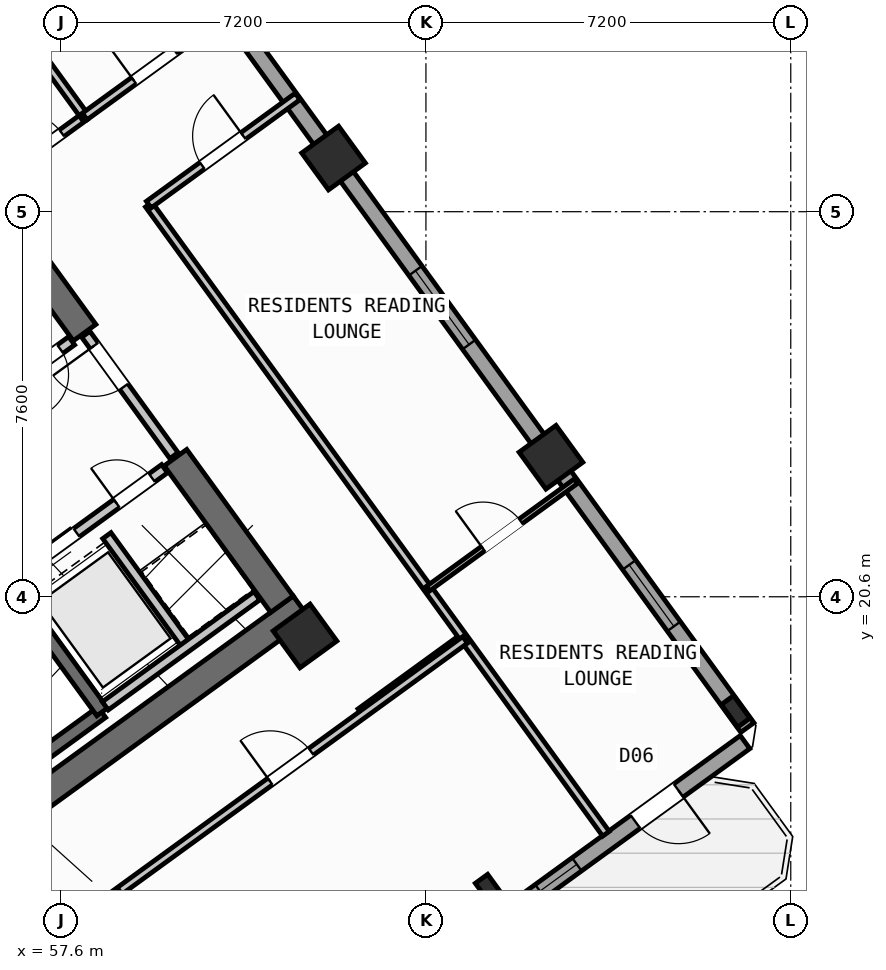
"""IFC4 building model, lengths in metres.
Left out: names, types, materials, properties, quantities, classifications, styles, units other than length and angle.
Written with IfcOpenShell. Run it as: python <this file> out.ifc"""

import sys

from ifc_helpers import new_model, si_unit, direction, frame, frame_2d, origin, origin_2d, place, context, subcontext, project, spatial, rectangle, hollow_rectangle, i_section, extrude, source, transform, mapped, element, fill, save


model = new_model("IFC4")
c1 = context("Model", 3, precision=1e-05, world=origin(), true_north=direction((0.0, 1.0)))
c2 = subcontext(c1, "Body", "Model", "MODEL_VIEW")
j1 = project(units=[si_unit("LENGTHUNIT", "METRE"), si_unit("PLANEANGLEUNIT", "RADIAN")], contexts=[c1])
p1 = place(None, origin())
s1 = spatial("IfcSite", under=j1, at=p1, CompositionType="ELEMENT")
p2 = place(p1, origin())
s2 = spatial("IfcBuilding", under=s1, at=p2, CompositionType="ELEMENT")
p3 = place(p2, frame((0.0, 0.0, 151.5)))
s3 = spatial("IfcBuildingStorey", under=s2, at=p3, CompositionType="ELEMENT", Elevation=151.5)
p4 = place(p3, frame((52.359, 13.14, 0.0), z_axis=(0.0, 0.0, 1.0), x_axis=(0.809014896919, 0.587788139183, 0.0)))
e1 = element("IfcWall", 1, at=p4, inside=s3, PredefinedType="SHEAR", context=c2, shape_type="SweptSolid", body=[
    extrude(rectangle(XDim=12.34, YDim=0.55, at=frame_2d((6.17, 0.0))), origin(), (0.0, 0.0, 1.0), 3.35),
])
p5 = place(p3, frame((61.958, 20.454, 0.0), z_axis=(0.0, 0.0, 1.0), x_axis=(-0.587802113096, 0.809004744015, 0.0)))
e2 = element("IfcWall", 2, at=p5, inside=s3, PredefinedType="SHEAR", context=c2, shape_type="SweptSolid", body=[
    extrude(rectangle(XDim=3.575, YDim=0.55, at=frame_2d((1.788, 0.0))), origin(), (0.0, 0.0, 1.0), 3.35),
])
p6 = place(p3, frame((58.064, 25.813, 0.0), z_axis=(0.0, 0.0, 1.0), x_axis=(-0.587764933797, 0.809031756236, 0.0)))
e3 = element("IfcWall", 3, at=p6, inside=s3, PredefinedType="SHEAR", context=c2, shape_type="SweptSolid", body=[
    extrude(rectangle(XDim=6.425, YDim=0.55, at=frame_2d((3.212, 0.0))), origin(), (0.0, 0.0, 1.0), 3.35),
])
m1 = source(origin(), c2, "Body", "SweptSolid", [
    extrude(i_section(OverallWidth=0.3, OverallDepth=0.55, WebThickness=0.015, FlangeThickness=0.029, at=origin_2d()), origin(), (0.0, 0.0, 1.0), 3.6),
])
p7 = place(p3, frame((66.058, 14.811, 0.0), z_axis=(0.0, 0.0, 1.0), x_axis=(0.809016994375, 0.587785252292, 0.0)))
e4 = element("IfcColumn", 4, at=p7, inside=s3, PredefinedType="COLUMN", context=c2, shape_type="MappedRepresentation", body=[
    mapped(m1, transform((0.0, 0.0, 0.0), scale=1.0)),
])
m2 = source(origin(), c2, "Body", "SweptSolid", [
    extrude(hollow_rectangle(XDim=0.9, YDim=0.9, WallThickness=0.036, at=origin_2d()), origin(), (0.0, 0.0, 1.0), 3.6),
])
p8 = place(p3, frame((62.414, 19.827, 0.0), z_axis=(0.0, 0.0, 1.0), x_axis=(0.809016994375, 0.587785252292, 0.0)))
e5 = element("IfcColumn", 5, at=p8, inside=s3, PredefinedType="COLUMN", context=c2, shape_type="MappedRepresentation", body=[
    mapped(m2, transform((0.0, 0.0, 0.0), scale=1.0)),
])
p9 = place(p3, frame((70.912, 18.338, 0.0), z_axis=(0.0, 0.0, 1.0), x_axis=(0.809016994375, 0.587785252292, 0.0)))
e6 = element("IfcColumn", 6, at=p9, inside=s3, PredefinedType="COLUMN", context=c2, shape_type="MappedRepresentation", body=[
    mapped(m1, transform((0.0, 0.0, 0.0), scale=1.0)),
])
for number, where, z_axis, x_axis in (
    (7, (67.268, 23.354, 0.0), (0.0, 0.0, 1.0), (0.809, 0.588, 0.0)),
    (8, (62.977, 29.259, 0.0), (0.0, 0.0, 1.0), (0.809, 0.588, 0.0)),
):
    element("IfcColumn", number, at=place(p3, frame(where, z_axis=z_axis, x_axis=x_axis)), inside=s3, PredefinedType="COLUMN", context=c2, shape_type="MappedRepresentation", body=[
        mapped(m2, transform((0.0, 0.0, 0.0), scale=1.0)),
    ])
p10 = place(p3, frame((43.938, 25.192, 0.0), z_axis=(0.0, 0.0, 1.0), x_axis=(0.809016324578, 0.587786174187, 0.0)))
e9 = element("IfcWall", 9, at=p10, inside=s3, PredefinedType="STANDARD", context=c2, shape_type="SweptSolid", body=[
    extrude(rectangle(XDim=17.587, YDim=0.32, at=frame_2d((8.794, 0.0))), origin(), (0.0, 0.0, 1.0), 3.35),
])
p11 = place(p10, frame((14.914, 0.0, 0.0)))
e10 = element("IfcOpeningElement", 10, at=p11, cuts=e9, PredefinedType="OPENING", context=c2, shape_type="SweptSolid", body=[
    extrude(rectangle(XDim=1.05, YDim=2.15, at=frame_2d((0.525, 1.075))), frame((0.0, 0.17, 0.0), z_axis=(0.0, -1.0, 0.0), x_axis=(1.0, 0.0, 0.0)), (0.0, 0.0, 1.0), 0.34),
])
p12 = place(p10, frame((2.368, 0.0, 0.8)))
e11 = element("IfcOpeningElement", 11, at=p12, cuts=e9, PredefinedType="OPENING", context=c2, shape_type="SweptSolid", body=[
    extrude(rectangle(XDim=2.1, YDim=1.55, at=frame_2d((1.05, 0.775))), frame((0.0, 0.17, 0.0), z_axis=(0.0, -1.0, 0.0), x_axis=(1.0, 0.0, 0.0)), (0.0, 0.0, 1.0), 0.34),
])
p13 = place(p10, frame((7.419, 0.0, 0.8)))
e12 = element("IfcOpeningElement", 12, at=p13, cuts=e9, PredefinedType="OPENING", context=c2, shape_type="SweptSolid", body=[
    extrude(rectangle(XDim=2.1, YDim=1.55, at=frame_2d((1.05, 0.775))), frame((0.0, 0.17, 0.0), z_axis=(0.0, -1.0, 0.0), x_axis=(1.0, 0.0, 0.0)), (0.0, 0.0, 1.0), 0.34),
])
p14 = place(p3, frame((58.455, 35.484, 0.0), z_axis=(0.0, 0.0, 1.0), x_axis=(0.587783625747, -0.809018176127, 0.0)))
e13 = element("IfcWall", 13, at=p14, inside=s3, PredefinedType="STANDARD", context=c2, shape_type="SweptSolid", body=[
    extrude(rectangle(XDim=21.587, YDim=0.32, at=frame_2d((10.794, 0.0))), origin(), (0.0, 0.0, 1.0), 2.775),
])
p15 = place(p14, frame((1.504, 0.0, 0.85)))
e14 = element("IfcOpeningElement", 14, at=p15, cuts=e13, PredefinedType="OPENING", context=c2, shape_type="SweptSolid", body=[
    extrude(rectangle(XDim=1.8, YDim=1.5, at=frame_2d((0.9, 0.75))), frame((0.0, 0.17, 0.0), z_axis=(0.0, -1.0, 0.0), x_axis=(1.0, 0.0, 0.0)), (0.0, 0.0, 1.0), 0.34),
])
p16 = place(p14, frame((10.444, 0.0, 0.85)))
e15 = element("IfcOpeningElement", 15, at=p16, cuts=e13, PredefinedType="OPENING", context=c2, shape_type="SweptSolid", body=[
    extrude(rectangle(XDim=1.8, YDim=1.5, at=frame_2d((0.9, 0.75))), frame((0.0, 0.17, 0.0), z_axis=(0.0, -1.0, 0.0), x_axis=(1.0, 0.0, 0.0)), (0.0, 0.0, 1.0), 0.34),
])
p17 = place(p14, frame((17.62, 0.0, 0.85)))
e16 = element("IfcOpeningElement", 16, at=p17, cuts=e13, PredefinedType="OPENING", context=c2, shape_type="SweptSolid", body=[
    extrude(rectangle(XDim=1.5, YDim=1.5, at=frame_2d((0.75, 0.75))), frame((0.0, 0.17, 0.0), z_axis=(0.0, -1.0, 0.0), x_axis=(1.0, 0.0, 0.0)), (0.0, 0.0, 1.0), 0.34),
])
p18 = place(p3, frame((71.098, 17.731, 0.0), z_axis=(0.0, 0.0, 1.0), x_axis=(-0.809021120468, -0.587779573171, 0.0)))
e17 = element("IfcWall", 17, at=p18, inside=s3, PredefinedType="STANDARD", context=c2, shape_type="SweptSolid", body=[
    extrude(rectangle(XDim=17.588, YDim=0.32, at=frame_2d((8.794, 0.0))), origin(), (0.0, 0.0, 1.0), 3.35),
])
p19 = place(p18, frame((1.624, 0.0, 0.0)))
e18 = element("IfcOpeningElement", 18, at=p19, cuts=e17, PredefinedType="OPENING", context=c2, shape_type="SweptSolid", body=[
    extrude(rectangle(XDim=1.05, YDim=2.15, at=frame_2d((0.525, 1.075))), frame((0.0, 0.17, 0.0), z_axis=(0.0, -1.0, 0.0), x_axis=(1.0, 0.0, 0.0)), (0.0, 0.0, 1.0), 0.34),
])
p20 = place(p18, frame((4.104, 0.0, 1.0)))
e19 = element("IfcOpeningElement", 19, at=p20, cuts=e17, PredefinedType="OPENING", context=c2, shape_type="SweptSolid", body=[
    extrude(rectangle(XDim=0.9, YDim=1.25, at=frame_2d((0.45, 0.625))), frame((0.0, 0.17, 0.0), z_axis=(0.0, -1.0, 0.0), x_axis=(1.0, 0.0, 0.0)), (0.0, 0.0, 1.0), 0.34),
])
p21 = place(p18, frame((7.879, 0.0, 0.85)))
e20 = element("IfcOpeningElement", 20, at=p21, cuts=e17, PredefinedType="OPENING", context=c2, shape_type="SweptSolid", body=[
    extrude(rectangle(XDim=1.8, YDim=1.5, at=frame_2d((0.9, 0.75))), frame((0.0, 0.17, 0.0), z_axis=(0.0, -1.0, 0.0), x_axis=(1.0, 0.0, 0.0)), (0.0, 0.0, 1.0), 0.34),
])
p22 = place(p18, frame((13.529, 0.0, 0.85)))
e21 = element("IfcOpeningElement", 21, at=p22, cuts=e17, PredefinedType="OPENING", context=c2, shape_type="SweptSolid", body=[
    extrude(rectangle(XDim=1.5, YDim=1.5, at=frame_2d((0.75, 0.75))), frame((0.0, 0.17, 0.0), z_axis=(0.0, -1.0, 0.0), x_axis=(1.0, 0.0, 0.0)), (0.0, 0.0, 1.0), 0.34),
])
p23 = place(p3, frame((52.472, 14.013, 0.0), z_axis=(0.0, 0.0, 1.0), x_axis=(0.809028366311, 0.587769599847, 0.0)))
e22 = element("IfcWall", 22, at=p23, inside=s3, PredefinedType="SHEAR", context=c2, shape_type="SweptSolid", body=[
    extrude(rectangle(XDim=7.33, YDim=0.26, at=frame_2d((3.665, 0.0))), origin(), (0.0, 0.0, 1.0), 3.35),
])
p24 = place(p3, frame((58.41, 18.327, 0.0), z_axis=(0.0, 0.0, 1.0), x_axis=(-0.58776738483, 0.809029975545, 0.0)))
e23 = element("IfcWall", 23, at=p24, inside=s3, PredefinedType="SHEAR", context=c2, shape_type="SweptSolid", body=[
    extrude(rectangle(XDim=3.16, YDim=0.26, at=frame_2d((1.58, 0.0))), origin(), (0.0, 0.0, 1.0), 3.35),
])
p25 = place(p3, frame((56.553, 20.884, 0.0), z_axis=(0.0, 0.0, 1.0), x_axis=(0.809023564264, 0.58777620951, 0.0)))
e24 = element("IfcWall", 24, at=p25, inside=s3, PredefinedType="STANDARD", context=c2, shape_type="SweptSolid", body=[
    extrude(rectangle(XDim=3.818, YDim=0.2, at=frame_2d((1.909, 0.0))), origin(), (0.0, 0.0, 1.0), 3.34),
])
p26 = place(p25, frame((0.57, 0.0, 0.0)))
e25 = element("IfcOpeningElement", 25, at=p26, cuts=e24, PredefinedType="OPENING", context=c2, shape_type="SweptSolid", body=[
    extrude(rectangle(XDim=1.1, YDim=2.15, at=frame_2d((0.55, 1.075))), frame((0.0, 0.11, 0.0), z_axis=(0.0, -1.0, 0.0), x_axis=(1.0, 0.0, 0.0)), (0.0, 0.0, 1.0), 0.22),
])
p27 = place(p25, frame((2.65, 0.0, 0.0)))
e26 = element("IfcOpeningElement", 26, at=p27, cuts=e24, PredefinedType="OPENING", context=c2, shape_type="SweptSolid", body=[
    extrude(rectangle(XDim=0.86, YDim=2.05, at=frame_2d((0.43, 1.025))), frame((0.0, 0.11, 0.0), z_axis=(0.0, -1.0, 0.0), x_axis=(1.0, 0.0, 0.0)), (0.0, 0.0, 1.0), 0.22),
])
p28 = place(p3, frame((60.067, 19.655, 0.0), z_axis=(0.0, 0.0, 1.0), x_axis=(-0.587800520745, 0.809005900975, 0.0)))
e27 = element("IfcWall", 27, at=p28, inside=s3, PredefinedType="STANDARD", context=c2, shape_type="SweptSolid", body=[
    extrude(rectangle(XDim=2.66, YDim=0.2, at=frame_2d((1.33, 0.0))), origin(), (0.0, 0.0, 1.0), 3.34),
])
p29 = place(p3, frame((58.472, 18.447, 0.0), z_axis=(0.0, 0.0, 1.0), x_axis=(0.809018631237, 0.587782999339, 0.0)))
e28 = element("IfcWall", 28, at=p29, inside=s3, PredefinedType="STANDARD", context=c2, shape_type="SweptSolid", body=[
    extrude(rectangle(XDim=3.698, YDim=0.2, at=frame_2d((1.849, 0.0))), origin(), (0.0, 0.0, 1.0), 3.34),
])
p30 = place(p3, frame((53.425, 22.468, 0.0), z_axis=(0.0, 0.0, 1.0), x_axis=(0.809024377198, 0.587775090574, 0.0)))
e29 = element("IfcWall", 29, at=p30, inside=s3, PredefinedType="STANDARD", context=c2, shape_type="SweptSolid", body=[
    extrude(rectangle(XDim=5.418, YDim=0.2, at=frame_2d((2.709, 0.0))), origin(), (0.0, 0.0, 1.0), 3.34),
])
p31 = place(p30, frame((4.28, 0.0, 0.0)))
e30 = element("IfcOpeningElement", 30, at=p31, cuts=e29, PredefinedType="OPENING", context=c2, shape_type="SweptSolid", body=[
    extrude(rectangle(XDim=0.86, YDim=2.05, at=frame_2d((0.43, 1.025))), frame((0.0, 0.11, 0.0), z_axis=(0.0, -1.0, 0.0), x_axis=(1.0, 0.0, 0.0)), (0.0, 0.0, 1.0), 0.22),
])
p32 = place(p30, frame((1.45, 0.0, 0.0)))
e31 = element("IfcOpeningElement", 31, at=p32, cuts=e29, PredefinedType="OPENING", context=c2, shape_type="SweptSolid", body=[
    extrude(rectangle(XDim=0.86, YDim=2.05, at=frame_2d((0.43, 1.025))), frame((0.0, 0.11, 0.0), z_axis=(0.0, -1.0, 0.0), x_axis=(1.0, 0.0, 0.0)), (0.0, 0.0, 1.0), 0.22),
])
p33 = place(p3, frame((59.827, 23.386, 0.0), z_axis=(0.0, 0.0, 1.0), x_axis=(-0.587803840107, 0.809003489211, 0.0)))
e32 = element("IfcWall", 32, at=p33, inside=s3, PredefinedType="STANDARD", context=c2, shape_type="SweptSolid", body=[
    extrude(rectangle(XDim=2.96, YDim=0.2, at=frame_2d((1.48, 0.0))), origin(), (0.0, 0.0, 1.0), 3.34),
])
p34 = place(p33, frame((1.68, 0.0, 0.0)))
e33 = element("IfcOpeningElement", 33, at=p34, cuts=e32, PredefinedType="OPENING", context=c2, shape_type="SweptSolid", body=[
    extrude(rectangle(XDim=1.0, YDim=2.1, at=frame_2d((0.5, 1.05))), frame((0.0, 0.11, 0.0), z_axis=(0.0, -1.0, 0.0), x_axis=(1.0, 0.0, 0.0)), (0.0, 0.0, 1.0), 0.22),
])
p35 = place(p3, frame((63.507, 18.322, 0.0), z_axis=(0.0, 0.0, 1.0), x_axis=(0.809034604122, 0.587761013791, 0.0)))
e34 = element("IfcWall", 34, at=p35, inside=s3, PredefinedType="PARTITIONING", context=c2, shape_type="SweptSolid", body=[
    extrude(rectangle(XDim=2.51, YDim=0.16, at=frame_2d((1.255, 0.0))), origin(), (0.0, 0.0, 1.0), 3.34),
])
p36 = place(p3, frame((56.281, 28.782, 0.0), z_axis=(0.0, 0.0, 1.0), x_axis=(0.80902286611, 0.587777170458, 0.0)))
e35 = element("IfcWall", 35, at=p36, inside=s3, PredefinedType="PARTITIONING", context=c2, shape_type="SweptSolid", body=[
    extrude(rectangle(XDim=2.208, YDim=0.16, at=frame_2d((1.104, 0.0))), origin(), (0.0, 0.0, 1.0), 3.34),
])
p37 = place(p36, frame((0.648, 0.0, 0.0)))
e36 = element("IfcOpeningElement", 36, at=p37, cuts=e35, PredefinedType="OPENING", context=c2, shape_type="SweptSolid", body=[
    extrude(rectangle(XDim=1.0, YDim=2.1, at=frame_2d((0.5, 1.05))), frame((0.0, 0.09, 0.0), z_axis=(0.0, -1.0, 0.0), x_axis=(1.0, 0.0, 0.0)), (0.0, 0.0, 1.0), 0.18),
])
p38 = place(p3, frame((68.353, 15.922, 0.0), z_axis=(0.0, 0.0, 1.0), x_axis=(-0.587782002009, 0.809019355834, 0.0)))
e37 = element("IfcWall", 37, at=p38, inside=s3, PredefinedType="PARTITIONING", context=c2, shape_type="SweptSolid", body=[
    extrude(rectangle(XDim=15.35, YDim=0.16, at=frame_2d((7.675, 0.0))), origin(), (0.0, 0.0, 1.0), 3.34),
])
p39 = place(p3, frame((58.067, 30.08, 0.0), z_axis=(0.0, 0.0, 1.0), x_axis=(-0.587812175236, 0.808997433027, 0.0)))
e38 = element("IfcWall", 38, at=p39, inside=s3, PredefinedType="PARTITIONING", context=c2, shape_type="SweptSolid", body=[
    extrude(rectangle(XDim=4.2, YDim=0.16, at=frame_2d((2.1, 0.0))), origin(), (0.0, 0.0, 1.0), 3.34),
])
p40 = place(p3, frame((59.331, 28.341, 0.0), z_axis=(0.0, 0.0, 1.0), x_axis=(0.809003564202, 0.587803736896, 0.0)))
e39 = element("IfcWall", 39, at=p40, inside=s3, PredefinedType="PARTITIONING", context=c2, shape_type="SweptSolid", body=[
    extrude(rectangle(XDim=3.63, YDim=0.16, at=frame_2d((1.815, 0.0))), origin(), (0.0, 0.0, 1.0), 3.34),
])
p41 = place(p40, frame((1.305, 0.0, 0.0)))
e40 = element("IfcOpeningElement", 40, at=p41, cuts=e39, PredefinedType="OPENING", context=c2, shape_type="SweptSolid", body=[
    extrude(rectangle(XDim=1.0, YDim=2.1, at=frame_2d((0.5, 1.05))), frame((0.0, 0.09, 0.0), z_axis=(0.0, -1.0, 0.0), x_axis=(1.0, 0.0, 0.0)), (0.0, 0.0, 1.0), 0.18),
])
p42 = place(p3, frame((58.067, 30.08, 0.0), z_axis=(0.0, 0.0, 1.0), x_axis=(0.809012309495, 0.587791700422, 0.0)))
e41 = element("IfcWall", 41, at=p42, inside=s3, PredefinedType="PARTITIONING", context=c2, shape_type="SweptSolid", body=[
    extrude(rectangle(XDim=3.63, YDim=0.16, at=frame_2d((1.815, 0.0))), origin(), (0.0, 0.0, 1.0), 3.34),
])
p43 = place(p42, frame((1.2, 0.0, 0.0)))
e42 = element("IfcOpeningElement", 42, at=p43, cuts=e41, PredefinedType="OPENING", context=c2, shape_type="SweptSolid", body=[
    extrude(rectangle(XDim=1.0, YDim=2.1, at=frame_2d((0.5, 1.05))), frame((0.0, 0.09, 0.0), z_axis=(0.0, -1.0, 0.0), x_axis=(1.0, 0.0, 0.0)), (0.0, 0.0, 1.0), 0.18),
])
p44 = place(p3, frame((64.839, 20.759, 0.0), z_axis=(0.0, 0.0, 1.0), x_axis=(0.809013833588, 0.587789602718, 0.0)))
e43 = element("IfcWall", 43, at=p44, inside=s3, PredefinedType="PARTITIONING", context=c2, shape_type="SweptSolid", body=[
    extrude(rectangle(XDim=3.61, YDim=0.11, at=frame_2d((1.805, 0.0))), origin(), (0.0, 0.0, 1.0), 3.34),
])
p45 = place(p44, frame((1.345, 0.0, 0.0)))
e44 = element("IfcOpeningElement", 44, at=p45, cuts=e43, PredefinedType="OPENING", context=c2, shape_type="SweptSolid", body=[
    extrude(rectangle(XDim=0.92, YDim=2.08, at=frame_2d((0.46, 1.04))), frame((0.0, 0.065, 0.0), z_axis=(0.0, -1.0, 0.0), x_axis=(1.0, 0.0, 0.0)), (0.0, 0.0, 1.0), 0.13),
])
p46 = place(p3, frame((53.705, 11.126, 0.0), z_axis=(0.0, 0.0, 1.0), x_axis=(0.809014504436, 0.587788679384, 0.0)))
e45 = element("IfcWall", 45, at=p46, inside=s3, PredefinedType="PARTITIONING", context=c2, shape_type="SweptSolid", body=[
    extrude(rectangle(XDim=14.67, YDim=0.16, at=frame_2d((7.335, 0.0))), origin(), (0.0, 0.0, 1.0), 3.34),
])
p47 = place(p46, frame((3.215, 0.0, 0.0)))
e46 = element("IfcOpeningElement", 46, at=p47, cuts=e45, PredefinedType="OPENING", context=c2, shape_type="SweptSolid", body=[
    extrude(rectangle(XDim=1.0, YDim=2.1, at=frame_2d((0.5, 1.05))), frame((0.0, 0.09, 0.0), z_axis=(0.0, -1.0, 0.0), x_axis=(1.0, 0.0, 0.0)), (0.0, 0.0, 1.0), 0.18),
])
p48 = place(p46, frame((9.915, 0.0, 0.0)))
e47 = element("IfcOpeningElement", 47, at=p48, cuts=e45, PredefinedType="OPENING", context=c2, shape_type="SweptSolid", body=[
    extrude(rectangle(XDim=1.0, YDim=2.1, at=frame_2d((0.5, 1.05))), frame((0.0, 0.09, 0.0), z_axis=(0.0, -1.0, 0.0), x_axis=(1.0, 0.0, 0.0)), (0.0, 0.0, 1.0), 0.18),
])
m3 = source(origin(), c2, "Body", "SweptSolid", [
    extrude(rectangle(XDim=1.05, YDim=2.15, at=frame_2d((0.525, 1.075))), frame((0.0, 0.025, 0.0), z_axis=(0.0, -1.0, 0.0), x_axis=(1.0, 0.0, 0.0)), (0.0, 0.0, 1.0), 0.05),
])
p49 = place(p19, origin())
e48 = element("IfcDoor", 48, at=p49, inside=s3, OperationType="SINGLE_SWING_LEFT", PredefinedType="DOOR", context=c2, shape_type="MappedRepresentation", body=[
    mapped(m3, transform((0.0, 0.0, 0.0), scale=1.0)),
])
fill(e18, e48)
m4 = source(origin(), c2, "Body", "SweptSolid", [
    extrude(rectangle(XDim=1.8, YDim=1.5, at=frame_2d((0.9, 0.75))), frame((0.0, 0.03, 0.0), z_axis=(0.0, -1.0, 0.0), x_axis=(1.0, 0.0, 0.0)), (0.0, 0.0, 1.0), 0.06),
])
p50 = place(p16, origin())
e49 = element("IfcWindow", 49, at=p50, inside=s3, PartitioningType="SINGLE_PANEL", PredefinedType="WINDOW", context=c2, shape_type="MappedRepresentation", body=[
    mapped(m4, transform((0.0, 0.0, 0.0), scale=1.0)),
])
fill(e15, e49)
m5 = source(origin(), c2, "Body", "SweptSolid", [
    extrude(rectangle(XDim=1.5, YDim=1.5, at=frame_2d((0.75, 0.75))), frame((0.0, 0.03, 0.0), z_axis=(0.0, -1.0, 0.0), x_axis=(1.0, 0.0, 0.0)), (0.0, 0.0, 1.0), 0.06),
])
p51 = place(p17, origin())
e50 = element("IfcWindow", 50, at=p51, inside=s3, PartitioningType="SINGLE_PANEL", PredefinedType="WINDOW", context=c2, shape_type="MappedRepresentation", body=[
    mapped(m5, transform((0.0, 0.0, 0.0), scale=1.0)),
])
fill(e16, e50)
m6 = source(origin(), c2, "Body", "SweptSolid", [
    extrude(rectangle(XDim=0.9, YDim=1.25, at=frame_2d((0.45, 0.625))), frame((0.0, 0.03, 0.0), z_axis=(0.0, -1.0, 0.0), x_axis=(1.0, 0.0, 0.0)), (0.0, 0.0, 1.0), 0.06),
])
p52 = place(p20, origin())
e51 = element("IfcWindow", 51, at=p52, inside=s3, PartitioningType="SINGLE_PANEL", PredefinedType="WINDOW", context=c2, shape_type="MappedRepresentation", body=[
    mapped(m6, transform((0.0, 0.0, 0.0), scale=1.0)),
])
fill(e19, e51)
m7 = source(origin(), c2, "Body", "SweptSolid", [
    extrude(rectangle(XDim=1.1, YDim=2.15, at=frame_2d((0.55, 1.075))), frame((0.0, 0.025, 0.0), z_axis=(0.0, -1.0, 0.0), x_axis=(1.0, 0.0, 0.0)), (0.0, 0.0, 1.0), 0.05),
])
p53 = place(p26, origin())
e52 = element("IfcDoor", 52, at=p53, inside=s3, OperationType="DOUBLE_DOOR_SLIDING", PredefinedType="DOOR", context=c2, shape_type="MappedRepresentation", body=[
    mapped(m7, transform((0.0, 0.0, 0.0), scale=1.0)),
])
fill(e25, e52)
m8 = source(origin(), c2, "Body", "SweptSolid", [
    extrude(rectangle(XDim=0.86, YDim=2.05, at=frame_2d((0.43, 1.025))), frame((0.0, 0.025, 0.0), z_axis=(0.0, -1.0, 0.0), x_axis=(1.0, 0.0, 0.0)), (0.0, 0.0, 1.0), 0.05),
])
p54 = place(p27, origin())
e53 = element("IfcDoor", 53, at=p54, inside=s3, OperationType="SINGLE_SWING_LEFT", PredefinedType="DOOR", context=c2, shape_type="MappedRepresentation", body=[
    mapped(m8, transform((0.0, 0.0, 0.0), scale=1.0)),
])
fill(e26, e53)
p55 = place(p31, frame((0.86, 0.0, 0.0), z_axis=(0.0, 0.0, 1.0), x_axis=(-1.0, 0.0, 0.0)))
e54 = element("IfcDoor", 54, at=p55, inside=s3, OperationType="SINGLE_SWING_RIGHT", PredefinedType="DOOR", context=c2, shape_type="MappedRepresentation", body=[
    mapped(m8, transform((0.0, 0.0, 0.0), scale=1.0)),
])
fill(e30, e54)
m9 = source(origin(), c2, "Body", "SweptSolid", [
    extrude(rectangle(XDim=1.0, YDim=2.1, at=frame_2d((0.5, 1.05))), frame((0.0, 0.025, 0.0), z_axis=(0.0, -1.0, 0.0), x_axis=(1.0, 0.0, 0.0)), (0.0, 0.0, 1.0), 0.05),
])
p56 = place(p37, origin())
e55 = element("IfcDoor", 55, at=p56, inside=s3, OperationType="SINGLE_SWING_LEFT", PredefinedType="DOOR", context=c2, shape_type="MappedRepresentation", body=[
    mapped(m9, transform((0.0, 0.0, 0.0), scale=1.0)),
])
fill(e36, e55)
p57 = place(p34, origin())
e56 = element("IfcDoor", 56, at=p57, inside=s3, OperationType="SINGLE_SWING_RIGHT", PredefinedType="DOOR", context=c2, shape_type="MappedRepresentation", body=[
    mapped(m9, transform((0.0, 0.0, 0.0), scale=1.0)),
])
fill(e33, e56)
p58 = place(p43, origin())
e57 = element("IfcDoor", 57, at=p58, inside=s3, OperationType="SINGLE_SWING_LEFT", PredefinedType="DOOR", context=c2, shape_type="MappedRepresentation", body=[
    mapped(m9, transform((0.0, 0.0, 0.0), scale=1.0)),
])
fill(e42, e57)
p59 = place(p41, origin())
e58 = element("IfcDoor", 58, at=p59, inside=s3, OperationType="SINGLE_SWING_RIGHT", PredefinedType="DOOR", context=c2, shape_type="MappedRepresentation", body=[
    mapped(m9, transform((0.0, 0.0, 0.0), scale=1.0)),
])
fill(e40, e58)
m10 = source(origin(), c2, "Body", "SweptSolid", [
    extrude(rectangle(XDim=0.92, YDim=2.08, at=frame_2d((0.46, 1.04))), frame((0.0, 0.025, 0.0), z_axis=(0.0, -1.0, 0.0), x_axis=(1.0, 0.0, 0.0)), (0.0, 0.0, 1.0), 0.05),
])
p60 = place(p45, origin())
e59 = element("IfcDoor", 59, at=p60, inside=s3, OperationType="SINGLE_SWING_LEFT", PredefinedType="DOOR", context=c2, shape_type="MappedRepresentation", body=[
    mapped(m10, transform((0.0, 0.0, 0.0), scale=1.0)),
])
fill(e44, e59)
p61 = place(p48, origin())
e60 = element("IfcDoor", 60, at=p61, inside=s3, OperationType="SINGLE_SWING_LEFT", PredefinedType="DOOR", context=c2, shape_type="MappedRepresentation", body=[
    mapped(m9, transform((0.0, 0.0, 0.0), scale=1.0)),
])
fill(e47, e60)
save(model, sys.argv[1])
